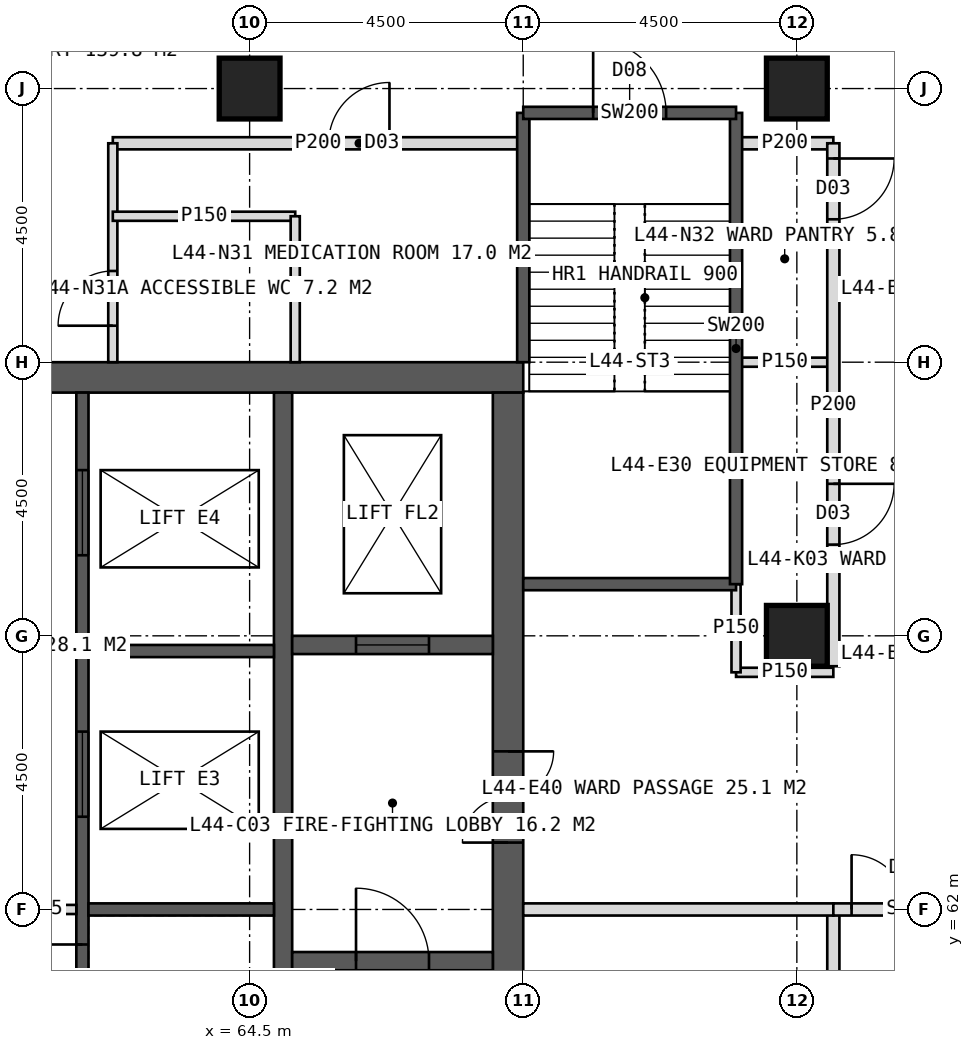
"""IFC4 building model, lengths in metres.
Left out: names, types, materials, properties, quantities, classifications, styles, units other than length and angle.
Written with IfcOpenShell. Run it as: python <this file> out.ifc"""

import sys

from ifc_helpers import new_model, si_unit, direction, frame, frame_2d, origin, origin_2d, place, context, subcontext, project, spatial, rectangle, hollow_rectangle, extrude, element, fill, save


model = new_model("IFC4")
c1 = context("Model", 3, precision=1e-05, world=origin(), true_north=direction((0.0, 1.0)))
c2 = subcontext(c1, "Body", "Model", "MODEL_VIEW")
j1 = project(units=[si_unit("LENGTHUNIT", "METRE"), si_unit("PLANEANGLEUNIT", "RADIAN")], contexts=[c1])
p1 = place(None, origin())
s1 = spatial("IfcSite", under=j1, at=p1, CompositionType="ELEMENT")
p2 = place(p1, origin())
s2 = spatial("IfcBuilding", under=s1, at=p2, CompositionType="ELEMENT")
p3 = place(p2, frame((0.0, 0.0, 185.0)))
s3 = spatial("IfcBuildingStorey", under=s2, at=p3, CompositionType="ELEMENT", Elevation=185.0)
p4 = place(p3, frame((51.0, 70.75, 0.0), z_axis=(0.0, 0.0, 1.0), x_axis=(1.0, 0.0, 0.0)))
e1 = element("IfcWall", 1, at=p4, inside=s3, PredefinedType="SHEAR", context=c2, shape_type="SweptSolid", body=[
    extrude(rectangle(XDim=18.0, YDim=0.5, at=frame_2d((9.0, 0.0))), origin(), (0.0, 0.0, 1.0), 4.0),
])
p5 = place(p4, frame((8.1, 0.0, 0.0)))
e2 = element("IfcOpeningElement", 2, at=p5, cuts=e1, PredefinedType="OPENING", context=c2, shape_type="SweptSolid", body=[
    extrude(rectangle(XDim=1.8, YDim=2.2, at=frame_2d((0.9, 1.1))), frame((0.0, 0.26, 0.0), z_axis=(0.0, -1.0, 0.0), x_axis=(1.0, 0.0, 0.0)), (0.0, 0.0, 1.0), 0.52),
])
p6 = place(p3, frame((68.75, 53.5, 0.0), z_axis=(0.0, 0.0, 1.0), x_axis=(0.0, 1.0, 0.0)))
e3 = element("IfcWall", 3, at=p6, inside=s3, PredefinedType="SHEAR", context=c2, shape_type="SweptSolid", body=[
    extrude(rectangle(XDim=17.0, YDim=0.5, at=frame_2d((8.5, 0.0))), origin(), (0.0, 0.0, 1.0), 4.0),
])
p7 = place(p6, frame((9.6, 0.0, 0.0)))
e4 = element("IfcOpeningElement", 4, at=p7, cuts=e3, PredefinedType="OPENING", context=c2, shape_type="SweptSolid", body=[
    extrude(rectangle(XDim=1.5, YDim=2.2, at=frame_2d((0.75, 1.1))), frame((0.0, 0.26, 0.0), z_axis=(0.0, -1.0, 0.0), x_axis=(1.0, 0.0, 0.0)), (0.0, 0.0, 1.0), 0.52),
])
p8 = place(p3, frame((65.05, 53.5, 0.0), z_axis=(0.0, 0.0, 1.0), x_axis=(0.0, 1.0, 0.0)))
e5 = element("IfcWall", 5, at=p8, inside=s3, PredefinedType="SHEAR", context=c2, shape_type="SweptSolid", body=[
    extrude(rectangle(XDim=17.0, YDim=0.3, at=frame_2d((8.5, 0.0))), origin(), (0.0, 0.0, 1.0), 4.0),
])
p9 = place(p3, frame((61.75, 53.5, 0.0), z_axis=(0.0, 0.0, 1.0), x_axis=(0.0, 1.0, 0.0)))
e6 = element("IfcWall", 6, at=p9, inside=s3, PredefinedType="SHEAR", context=c2, shape_type="SweptSolid", body=[
    extrude(rectangle(XDim=17.0, YDim=0.2, at=frame_2d((8.5, 0.0))), origin(), (0.0, 0.0, 1.0), 4.0),
])
p10 = place(p9, frame((0.6, 0.0, 0.0)))
e7 = element("IfcOpeningElement", 7, at=p10, cuts=e6, PredefinedType="OPENING", context=c2, shape_type="SweptSolid", body=[
    extrude(rectangle(XDim=1.0, YDim=2.1, at=frame_2d((0.5, 1.05))), frame((0.0, 0.11, 0.0), z_axis=(0.0, -1.0, 0.0), x_axis=(1.0, 0.0, 0.0)), (0.0, 0.0, 1.0), 0.22),
])
p11 = place(p9, frame((2.75, 0.0, 0.0)))
e8 = element("IfcOpeningElement", 8, at=p11, cuts=e6, PredefinedType="OPENING", context=c2, shape_type="SweptSolid", body=[
    extrude(rectangle(XDim=1.0, YDim=2.1, at=frame_2d((0.5, 1.05))), frame((0.0, 0.11, 0.0), z_axis=(0.0, -1.0, 0.0), x_axis=(1.0, 0.0, 0.0)), (0.0, 0.0, 1.0), 0.22),
])
p12 = place(p9, frame((4.824, 0.0, 0.0)))
e9 = element("IfcOpeningElement", 9, at=p12, cuts=e6, PredefinedType="OPENING", context=c2, shape_type="SweptSolid", body=[
    extrude(rectangle(XDim=1.0, YDim=2.1, at=frame_2d((0.5, 1.05))), frame((0.0, 0.11, 0.0), z_axis=(0.0, -1.0, 0.0), x_axis=(1.0, 0.0, 0.0)), (0.0, 0.0, 1.0), 0.22),
])
p13 = place(p9, frame((6.924, 0.0, 0.0)))
e10 = element("IfcOpeningElement", 10, at=p13, cuts=e6, PredefinedType="OPENING", context=c2, shape_type="SweptSolid", body=[
    extrude(rectangle(XDim=1.0, YDim=2.1, at=frame_2d((0.5, 1.05))), frame((0.0, 0.11, 0.0), z_axis=(0.0, -1.0, 0.0), x_axis=(1.0, 0.0, 0.0)), (0.0, 0.0, 1.0), 0.22),
])
p14 = place(p9, frame((10.025, 0.0, 0.0)))
e11 = element("IfcOpeningElement", 11, at=p14, cuts=e6, PredefinedType="OPENING", context=c2, shape_type="SweptSolid", body=[
    extrude(rectangle(XDim=1.4, YDim=2.2, at=frame_2d((0.7, 1.1))), frame((0.0, 0.11, 0.0), z_axis=(0.0, -1.0, 0.0), x_axis=(1.0, 0.0, 0.0)), (0.0, 0.0, 1.0), 0.22),
])
p15 = place(p9, frame((14.325, 0.0, 0.0)))
e12 = element("IfcOpeningElement", 12, at=p15, cuts=e6, PredefinedType="OPENING", context=c2, shape_type="SweptSolid", body=[
    extrude(rectangle(XDim=1.4, YDim=2.2, at=frame_2d((0.7, 1.1))), frame((0.0, 0.11, 0.0), z_axis=(0.0, -1.0, 0.0), x_axis=(1.0, 0.0, 0.0)), (0.0, 0.0, 1.0), 0.22),
])
for number, where, z_axis, x_axis in (
    (13, (61.85, 62.0, 0.0), (0.0, 0.0, 1.0), (1.0, 0.0, 0.0)),
    (14, (61.85, 66.25, 0.0), (0.0, 0.0, 1.0), (1.0, 0.0, 0.0)),
):
    element("IfcWall", number, at=place(p3, frame(where, z_axis=z_axis, x_axis=x_axis)), inside=s3, PredefinedType="SHEAR", context=c2, shape_type="SweptSolid", body=[
        extrude(rectangle(XDim=3.05, YDim=0.2, at=frame_2d((1.525, 0.0))), origin(), (0.0, 0.0, 1.0), 4.0),
    ])
p16 = place(p3, frame((65.2, 61.15, 0.0), z_axis=(0.0, 0.0, 1.0), x_axis=(1.0, 0.0, 0.0)))
e15 = element("IfcWall", 15, at=p16, inside=s3, PredefinedType="SHEAR", context=c2, shape_type="SweptSolid", body=[
    extrude(rectangle(XDim=3.3, YDim=0.3, at=frame_2d((1.65, 0.0))), origin(), (0.0, 0.0, 1.0), 4.0),
])
p17 = place(p16, frame((1.05, 0.0, 0.0)))
e16 = element("IfcOpeningElement", 16, at=p17, cuts=e15, PredefinedType="OPENING", context=c2, shape_type="SweptSolid", body=[
    extrude(rectangle(XDim=1.2, YDim=2.1, at=frame_2d((0.6, 1.05))), frame((0.0, 0.16, 0.0), z_axis=(0.0, -1.0, 0.0), x_axis=(1.0, 0.0, 0.0)), (0.0, 0.0, 1.0), 0.32),
])
p18 = place(p3, frame((65.2, 66.35, 0.0), z_axis=(0.0, 0.0, 1.0), x_axis=(1.0, 0.0, 0.0)))
e17 = element("IfcWall", 17, at=p18, inside=s3, PredefinedType="SHEAR", context=c2, shape_type="SweptSolid", body=[
    extrude(rectangle(XDim=3.3, YDim=0.3, at=frame_2d((1.65, 0.0))), origin(), (0.0, 0.0, 1.0), 4.0),
])
p19 = place(p18, frame((1.05, 0.0, 0.0)))
e18 = element("IfcOpeningElement", 18, at=p19, cuts=e17, PredefinedType="OPENING", context=c2, shape_type="SweptSolid", body=[
    extrude(rectangle(XDim=1.2, YDim=2.2, at=frame_2d((0.6, 1.1))), frame((0.0, 0.16, 0.0), z_axis=(0.0, -1.0, 0.0), x_axis=(1.0, 0.0, 0.0)), (0.0, 0.0, 1.0), 0.32),
])
for number, where, z_axis, x_axis in (
    (19, (73.5, 75.5, 0.0), (0.0, 0.0, 1.0), (1.0, 0.0, 0.0)),
    (20, (64.5, 75.5, 0.0), (0.0, 0.0, 1.0), (1.0, 0.0, 0.0)),
    (21, (73.5, 66.5, 0.0), (0.0, 0.0, 1.0), (1.0, 0.0, 0.0)),
):
    element("IfcColumn", number, at=place(p3, frame(where, z_axis=z_axis, x_axis=x_axis)), inside=s3, PredefinedType="COLUMN", context=c2, shape_type="SweptSolid", body=[
        extrude(hollow_rectangle(XDim=1.0, YDim=1.0, WallThickness=0.1, at=origin_2d()), origin(), (0.0, 0.0, 1.0), 4.0),
    ])
p20 = place(p3, frame((62.25, 74.6, 0.0), z_axis=(0.0, 0.0, 1.0), x_axis=(1.0, 0.0, 0.0)))
e22 = element("IfcWall", 22, at=p20, inside=s3, PredefinedType="PARTITIONING", context=c2, shape_type="SweptSolid", body=[
    extrude(rectangle(XDim=6.75, YDim=0.2, at=frame_2d((3.375, 0.0))), origin(), (0.0, 0.0, 1.0), 3.75),
])
p21 = place(p20, frame((3.55, 0.0, 0.0)))
e23 = element("IfcOpeningElement", 23, at=p21, cuts=e22, PredefinedType="OPENING", context=c2, shape_type="SweptSolid", body=[
    extrude(rectangle(XDim=1.0, YDim=2.1, at=frame_2d((0.5, 1.05))), frame((0.0, 0.11, 0.0), z_axis=(0.0, -1.0, 0.0), x_axis=(1.0, 0.0, 0.0)), (0.0, 0.0, 1.0), 0.22),
])
p22 = place(p3, frame((72.5, 74.6, 0.0), z_axis=(0.0, 0.0, 1.0), x_axis=(1.0, 0.0, 0.0)))
e24 = element("IfcWall", 24, at=p22, inside=s3, PredefinedType="PARTITIONING", context=c2, shape_type="SweptSolid", body=[
    extrude(rectangle(XDim=1.6, YDim=0.2, at=frame_2d((0.8, 0.0))), origin(), (0.0, 0.0, 1.0), 3.75),
])
p23 = place(p3, frame((62.25, 71.0, 0.0), z_axis=(0.0, 0.0, 1.0), x_axis=(0.0, 1.0, 0.0)))
e25 = element("IfcWall", 25, at=p23, inside=s3, PredefinedType="PARTITIONING", context=c2, shape_type="SweptSolid", body=[
    extrude(rectangle(XDim=3.6, YDim=0.15, at=frame_2d((1.8, 0.0))), origin(), (0.0, 0.0, 1.0), 3.75),
])
p24 = place(p23, frame((0.6, 0.0, 0.0)))
e26 = element("IfcOpeningElement", 26, at=p24, cuts=e25, PredefinedType="OPENING", context=c2, shape_type="SweptSolid", body=[
    extrude(rectangle(XDim=0.9, YDim=2.1, at=frame_2d((0.45, 1.05))), frame((0.0, 0.085, 0.0), z_axis=(0.0, -1.0, 0.0), x_axis=(1.0, 0.0, 0.0)), (0.0, 0.0, 1.0), 0.17),
])
p25 = place(p3, frame((62.25, 73.4, 0.0), z_axis=(0.0, 0.0, 1.0), x_axis=(1.0, 0.0, 0.0)))
e27 = element("IfcWall", 27, at=p25, inside=s3, PredefinedType="PARTITIONING", context=c2, shape_type="SweptSolid", body=[
    extrude(rectangle(XDim=3.0, YDim=0.15, at=frame_2d((1.5, 0.0))), origin(), (0.0, 0.0, 1.0), 3.75),
])
p26 = place(p3, frame((65.25, 71.0, 0.0), z_axis=(0.0, 0.0, 1.0), x_axis=(0.0, 1.0, 0.0)))
e28 = element("IfcWall", 28, at=p26, inside=s3, PredefinedType="PARTITIONING", context=c2, shape_type="SweptSolid", body=[
    extrude(rectangle(XDim=2.4, YDim=0.15, at=frame_2d((1.2, 0.0))), origin(), (0.0, 0.0, 1.0), 3.75),
])
p27 = place(p3, frame((72.5, 71.0, 0.0), z_axis=(0.0, 0.0, 1.0), x_axis=(1.0, 0.0, 0.0)))
e29 = element("IfcWall", 29, at=p27, inside=s3, PredefinedType="PARTITIONING", context=c2, shape_type="SweptSolid", body=[
    extrude(rectangle(XDim=1.6, YDim=0.15, at=frame_2d((0.8, 0.0))), origin(), (0.0, 0.0, 1.0), 3.75),
])
p28 = place(p3, frame((74.1, 74.6, 0.0), z_axis=(0.0, 0.0, 1.0), x_axis=(0.0, -1.0, 0.0)))
e30 = element("IfcWall", 30, at=p28, inside=s3, PredefinedType="PARTITIONING", context=c2, shape_type="SweptSolid", body=[
    extrude(rectangle(XDim=8.6, YDim=0.2, at=frame_2d((4.3, 0.0))), origin(), (0.0, 0.0, 1.0), 3.75),
])
p29 = place(p28, frame((0.25, 0.0, 0.0)))
e31 = element("IfcOpeningElement", 31, at=p29, cuts=e30, PredefinedType="OPENING", context=c2, shape_type="SweptSolid", body=[
    extrude(rectangle(XDim=1.0, YDim=2.1, at=frame_2d((0.5, 1.05))), frame((0.0, 0.11, 0.0), z_axis=(0.0, -1.0, 0.0), x_axis=(1.0, 0.0, 0.0)), (0.0, 0.0, 1.0), 0.22),
])
p30 = place(p28, frame((5.6, 0.0, 0.0)))
e32 = element("IfcOpeningElement", 32, at=p30, cuts=e30, PredefinedType="OPENING", context=c2, shape_type="SweptSolid", body=[
    extrude(rectangle(XDim=1.0, YDim=2.1, at=frame_2d((0.5, 1.05))), frame((0.0, 0.11, 0.0), z_axis=(0.0, -1.0, 0.0), x_axis=(1.0, 0.0, 0.0)), (0.0, 0.0, 1.0), 0.22),
])
p31 = place(p3, frame((74.1, 62.0, 0.0), z_axis=(0.0, 0.0, 1.0), x_axis=(0.0, -1.0, 0.0)))
e33 = element("IfcWall", 33, at=p31, inside=s3, PredefinedType="PARTITIONING", context=c2, shape_type="SweptSolid", body=[
    extrude(rectangle(XDim=14.1, YDim=0.2, at=frame_2d((7.05, 0.0))), origin(), (0.0, 0.0, 1.0), 3.75),
])
p32 = place(p31, frame((1.45, 0.0, 0.0)))
e34 = element("IfcOpeningElement", 34, at=p32, cuts=e33, PredefinedType="OPENING", context=c2, shape_type="SweptSolid", body=[
    extrude(rectangle(XDim=1.0, YDim=2.1, at=frame_2d((0.5, 1.05))), frame((0.0, 0.11, 0.0), z_axis=(0.0, -1.0, 0.0), x_axis=(1.0, 0.0, 0.0)), (0.0, 0.0, 1.0), 0.22),
])
p33 = place(p31, frame((11.05, 0.0, 0.0)))
e35 = element("IfcOpeningElement", 35, at=p33, cuts=e33, PredefinedType="OPENING", context=c2, shape_type="SweptSolid", body=[
    extrude(rectangle(XDim=1.0, YDim=2.1, at=frame_2d((0.5, 1.05))), frame((0.0, 0.11, 0.0), z_axis=(0.0, -1.0, 0.0), x_axis=(1.0, 0.0, 0.0)), (0.0, 0.0, 1.0), 0.22),
])
p34 = place(p3, frame((72.5, 65.9, 0.0), z_axis=(0.0, 0.0, 1.0), x_axis=(1.0, 0.0, 0.0)))
e36 = element("IfcWall", 36, at=p34, inside=s3, PredefinedType="PARTITIONING", context=c2, shape_type="SweptSolid", body=[
    extrude(rectangle(XDim=1.6, YDim=0.15, at=frame_2d((0.8, 0.0))), origin(), (0.0, 0.0, 1.0), 3.75),
])
p35 = place(p3, frame((69.0, 62.0, 0.0), z_axis=(0.0, 0.0, 1.0), x_axis=(1.0, 0.0, 0.0)))
e37 = element("IfcWall", 37, at=p35, inside=s3, PredefinedType="SOLIDWALL", context=c2, shape_type="SweptSolid", body=[
    extrude(rectangle(XDim=5.1, YDim=0.2, at=frame_2d((2.55, 0.0))), origin(), (0.0, 0.0, 1.0), 2.95),
])
p36 = place(p3, frame((74.1, 62.0, 0.0), z_axis=(0.0, 0.0, 1.0), x_axis=(1.0, 0.0, 0.0)))
e38 = element("IfcWall", 38, at=p36, inside=s3, PredefinedType="SOLIDWALL", context=c2, shape_type="SweptSolid", body=[
    extrude(rectangle(XDim=2.7, YDim=0.2, at=frame_2d((1.35, 0.0))), origin(), (0.0, 0.0, 1.0), 2.95),
])
p37 = place(p36, frame((0.3, 0.0, 0.0)))
e39 = element("IfcOpeningElement", 39, at=p37, cuts=e38, PredefinedType="OPENING", context=c2, shape_type="SweptSolid", body=[
    extrude(rectangle(XDim=1.8, YDim=2.2, at=frame_2d((0.9, 1.1))), frame((0.0, 0.11, 0.0), z_axis=(0.0, -1.0, 0.0), x_axis=(1.0, 0.0, 0.0)), (0.0, 0.0, 1.0), 0.22),
])
p38 = place(p3, frame((58.35, 62.0, 0.0), z_axis=(0.0, 0.0, 1.0), x_axis=(1.0, 0.0, 0.0)))
e40 = element("IfcWall", 40, at=p38, inside=s3, PredefinedType="PARTITIONING", context=c2, shape_type="SweptSolid", body=[
    extrude(rectangle(XDim=3.3, YDim=0.15, at=frame_2d((1.65, 0.0))), origin(), (0.0, 0.0, 1.0), 3.75),
])
p39 = place(p3, frame((72.5, 65.9, 0.0), z_axis=(0.0, 0.0, 1.0), x_axis=(0.0, 1.0, 0.0)))
e41 = element("IfcWall", 41, at=p39, inside=s3, PredefinedType="PARTITIONING", context=c2, shape_type="SweptSolid", body=[
    extrude(rectangle(XDim=1.45, YDim=0.15, at=frame_2d((0.725, 0.0))), origin(), (0.0, 0.0, 1.0), 3.75),
])
p40 = place(p3, frame((69.0, 71.0, 0.0), z_axis=(0.0, 0.0, 1.0), x_axis=(0.0, 1.0, 0.0)))
e42 = element("IfcWall", 42, at=p40, inside=s3, PredefinedType="SOLIDWALL", context=c2, shape_type="SweptSolid", body=[
    extrude(rectangle(XDim=4.1, YDim=0.2, at=frame_2d((2.05, 0.0))), origin(), (0.0, 0.0, 1.0), 3.75),
])
p41 = place(p3, frame((69.0, 67.35, 0.0), z_axis=(0.0, 0.0, 1.0), x_axis=(1.0, 0.0, 0.0)))
e43 = element("IfcWall", 43, at=p41, inside=s3, PredefinedType="SOLIDWALL", context=c2, shape_type="SweptSolid", body=[
    extrude(rectangle(XDim=3.5, YDim=0.2, at=frame_2d((1.75, 0.0))), origin(), (0.0, 0.0, 1.0), 3.75),
])
p42 = place(p3, frame((72.5, 67.35, 0.0), z_axis=(0.0, 0.0, 1.0), x_axis=(0.0, 1.0, 0.0)))
e44 = element("IfcWall", 44, at=p42, inside=s3, PredefinedType="SOLIDWALL", context=c2, shape_type="SweptSolid", body=[
    extrude(rectangle(XDim=7.75, YDim=0.2, at=frame_2d((3.875, 0.0))), origin(), (0.0, 0.0, 1.0), 3.75),
])
p43 = place(p3, frame((69.0, 75.1, 0.0), z_axis=(0.0, 0.0, 1.0), x_axis=(1.0, 0.0, 0.0)))
e45 = element("IfcWall", 45, at=p43, inside=s3, PredefinedType="SOLIDWALL", context=c2, shape_type="SweptSolid", body=[
    extrude(rectangle(XDim=3.5, YDim=0.2, at=frame_2d((1.75, 0.0))), origin(), (0.0, 0.0, 1.0), 3.75),
])
p44 = place(p43, frame((1.15, 0.0, 0.0)))
e46 = element("IfcOpeningElement", 46, at=p44, cuts=e45, PredefinedType="OPENING", context=c2, shape_type="SweptSolid", body=[
    extrude(rectangle(XDim=1.2, YDim=2.1, at=frame_2d((0.6, 1.05))), frame((0.0, 0.11, 0.0), z_axis=(0.0, -1.0, 0.0), x_axis=(1.0, 0.0, 0.0)), (0.0, 0.0, 1.0), 0.22),
])
p45 = place(p24, origin())
e47 = element("IfcDoor", 47, at=p45, inside=s3, OperationType="SINGLE_SWING_LEFT", PredefinedType="DOOR", context=c2, shape_type="SweptSolid", body=[
    extrude(rectangle(XDim=0.9, YDim=2.1, at=frame_2d((0.45, 1.05))), frame((0.0, 0.025, 0.0), z_axis=(0.0, -1.0, 0.0), x_axis=(1.0, 0.0, 0.0)), (0.0, 0.0, 1.0), 0.05),
])
fill(e26, e47)
p46 = place(p21, origin())
e48 = element("IfcDoor", 48, at=p46, inside=s3, OperationType="SINGLE_SWING_RIGHT", PredefinedType="DOOR", context=c2, shape_type="SweptSolid", body=[
    extrude(rectangle(XDim=1.0, YDim=2.1, at=frame_2d((0.5, 1.05))), frame((0.0, 0.025, 0.0), z_axis=(0.0, -1.0, 0.0), x_axis=(1.0, 0.0, 0.0)), (0.0, 0.0, 1.0), 0.05),
])
fill(e23, e48)
p47 = place(p29, origin())
e49 = element("IfcDoor", 49, at=p47, inside=s3, OperationType="SINGLE_SWING_LEFT", PredefinedType="DOOR", context=c2, shape_type="SweptSolid", body=[
    extrude(rectangle(XDim=1.0, YDim=2.1, at=frame_2d((0.5, 1.05))), frame((0.0, 0.025, 0.0), z_axis=(0.0, -1.0, 0.0), x_axis=(1.0, 0.0, 0.0)), (0.0, 0.0, 1.0), 0.05),
])
fill(e31, e49)
p48 = place(p30, origin())
e50 = element("IfcDoor", 50, at=p48, inside=s3, OperationType="SINGLE_SWING_LEFT", PredefinedType="DOOR", context=c2, shape_type="SweptSolid", body=[
    extrude(rectangle(XDim=1.0, YDim=2.1, at=frame_2d((0.5, 1.05))), frame((0.0, 0.025, 0.0), z_axis=(0.0, -1.0, 0.0), x_axis=(1.0, 0.0, 0.0)), (0.0, 0.0, 1.0), 0.05),
])
fill(e32, e50)
p49 = place(p37, origin())
e51 = element("IfcDoor", 51, at=p49, inside=s3, OperationType="DOUBLE_DOOR_DOUBLE_SWING", PredefinedType="DOOR", context=c2, shape_type="SweptSolid", body=[
    extrude(rectangle(XDim=1.8, YDim=2.2, at=frame_2d((0.9, 1.1))), frame((0.0, 0.025, 0.0), z_axis=(0.0, -1.0, 0.0), x_axis=(1.0, 0.0, 0.0)), (0.0, 0.0, 1.0), 0.05),
])
fill(e39, e51)
p50 = place(p7, origin())
e52 = element("IfcDoor", 52, at=p50, inside=s3, OperationType="DOUBLE_DOOR_SINGLE_SWING", PredefinedType="DOOR", context=c2, shape_type="SweptSolid", body=[
    extrude(rectangle(XDim=1.5, YDim=2.2, at=frame_2d((0.75, 1.1))), frame((0.0, 0.025, 0.0), z_axis=(0.0, -1.0, 0.0), x_axis=(1.0, 0.0, 0.0)), (0.0, 0.0, 1.0), 0.05),
])
fill(e4, e52)
p51 = place(p17, origin())
e53 = element("IfcDoor", 53, at=p51, inside=s3, OperationType="SINGLE_SWING_LEFT", PredefinedType="DOOR", context=c2, shape_type="SweptSolid", body=[
    extrude(rectangle(XDim=1.2, YDim=2.1, at=frame_2d((0.6, 1.05))), frame((0.0, 0.025, 0.0), z_axis=(0.0, -1.0, 0.0), x_axis=(1.0, 0.0, 0.0)), (0.0, 0.0, 1.0), 0.05),
])
fill(e16, e53)
p52 = place(p19, origin())
e54 = element("IfcDoor", 54, at=p52, inside=s3, OperationType="SLIDING_TO_LEFT", PredefinedType="DOOR", context=c2, shape_type="SweptSolid", body=[
    extrude(rectangle(XDim=1.2, YDim=2.2, at=frame_2d((0.6, 1.1))), frame((0.0, 0.025, 0.0), z_axis=(0.0, -1.0, 0.0), x_axis=(1.0, 0.0, 0.0)), (0.0, 0.0, 1.0), 0.05),
])
fill(e18, e54)
p53 = place(p13, origin())
e55 = element("IfcDoor", 55, at=p53, inside=s3, OperationType="SINGLE_SWING_RIGHT", PredefinedType="DOOR", context=c2, shape_type="SweptSolid", body=[
    extrude(rectangle(XDim=1.0, YDim=2.1, at=frame_2d((0.5, 1.05))), frame((0.0, 0.025, 0.0), z_axis=(0.0, -1.0, 0.0), x_axis=(1.0, 0.0, 0.0)), (0.0, 0.0, 1.0), 0.05),
])
fill(e10, e55)
p54 = place(p14, origin())
e56 = element("IfcDoor", 56, at=p54, inside=s3, OperationType="SLIDING_TO_LEFT", PredefinedType="DOOR", context=c2, shape_type="SweptSolid", body=[
    extrude(rectangle(XDim=1.4, YDim=2.2, at=frame_2d((0.7, 1.1))), frame((0.0, 0.025, 0.0), z_axis=(0.0, -1.0, 0.0), x_axis=(1.0, 0.0, 0.0)), (0.0, 0.0, 1.0), 0.05),
])
fill(e11, e56)
p55 = place(p15, origin())
e57 = element("IfcDoor", 57, at=p55, inside=s3, OperationType="SLIDING_TO_LEFT", PredefinedType="DOOR", context=c2, shape_type="SweptSolid", body=[
    extrude(rectangle(XDim=1.4, YDim=2.2, at=frame_2d((0.7, 1.1))), frame((0.0, 0.025, 0.0), z_axis=(0.0, -1.0, 0.0), x_axis=(1.0, 0.0, 0.0)), (0.0, 0.0, 1.0), 0.05),
])
fill(e12, e57)
p56 = place(p44, origin())
e58 = element("IfcDoor", 58, at=p56, inside=s3, OperationType="SINGLE_SWING_LEFT", PredefinedType="DOOR", context=c2, shape_type="SweptSolid", body=[
    extrude(rectangle(XDim=1.2, YDim=2.1, at=frame_2d((0.6, 1.05))), frame((0.0, 0.025, 0.0), z_axis=(0.0, -1.0, 0.0), x_axis=(1.0, 0.0, 0.0)), (0.0, 0.0, 1.0), 0.05),
])
fill(e46, e58)
save(model, sys.argv[1])
